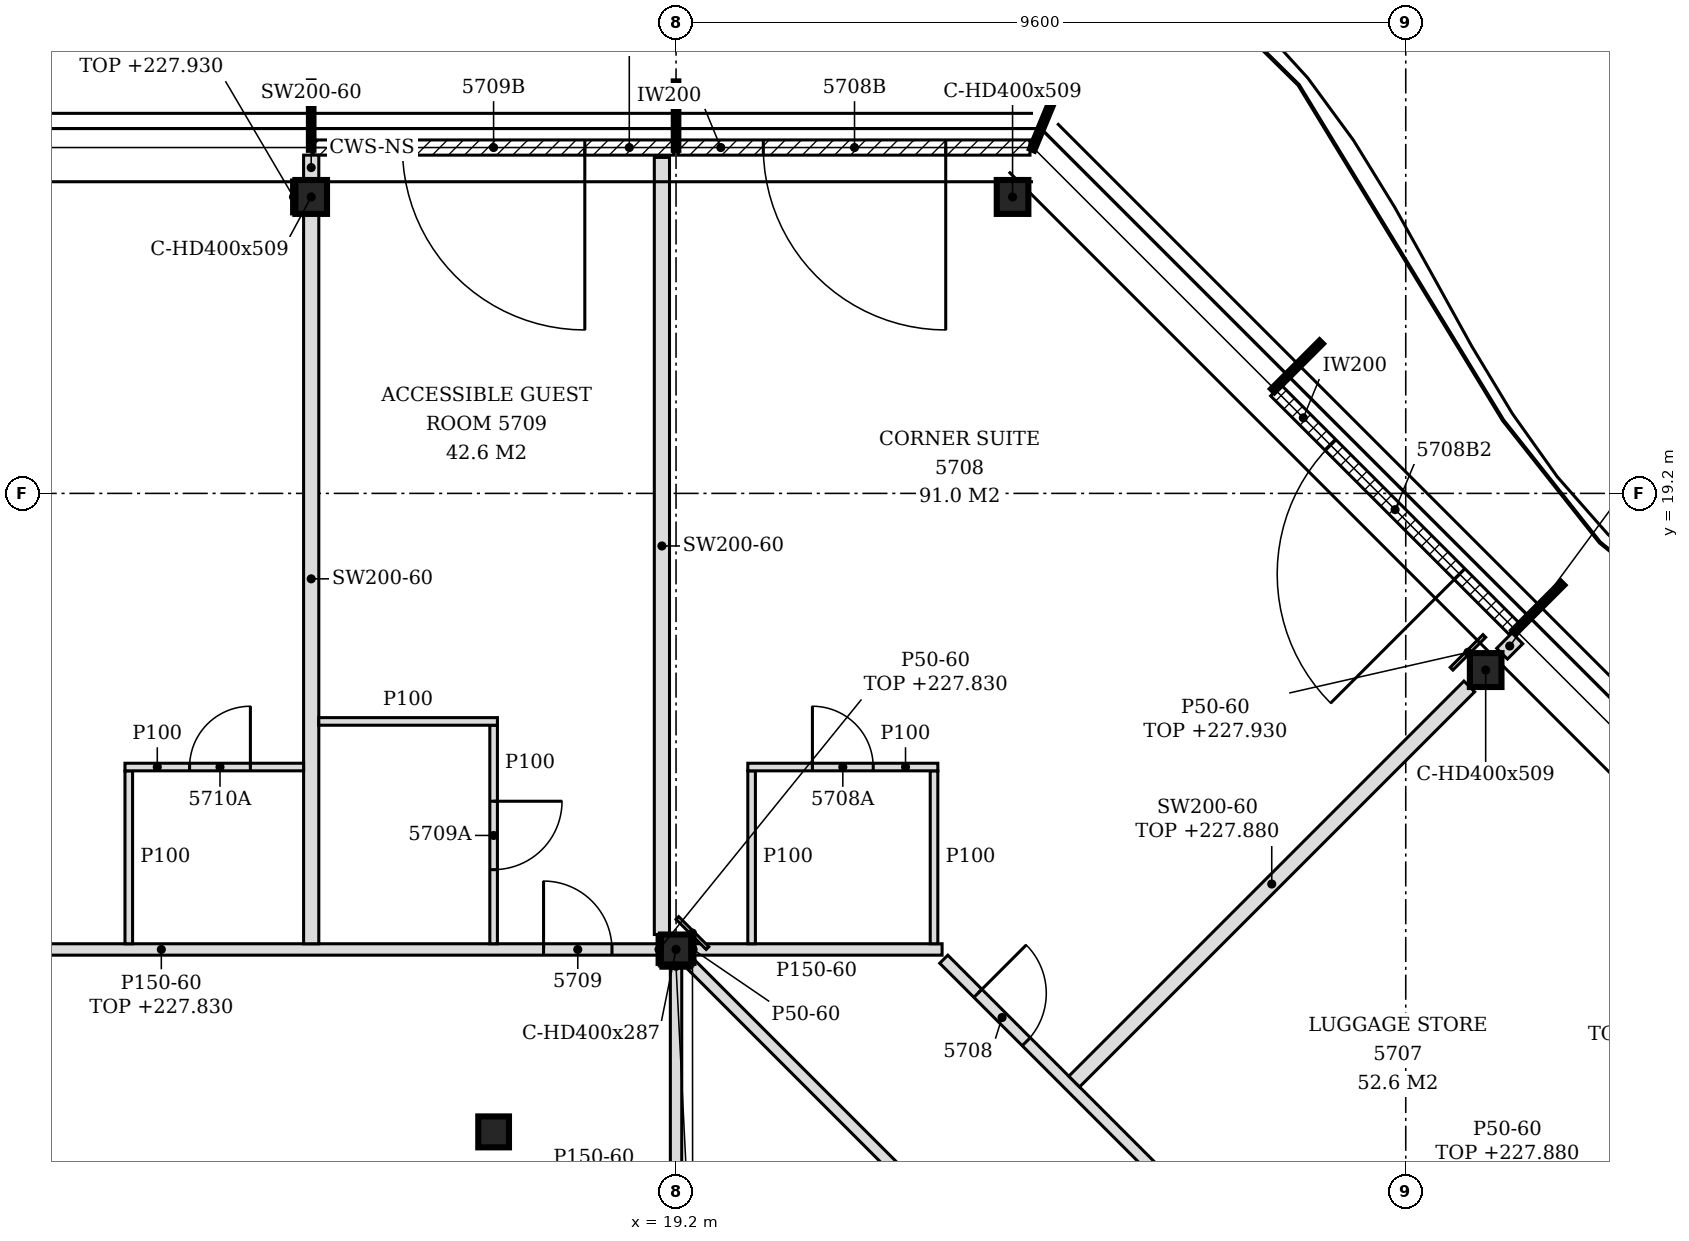
"""IFC4 building model, lengths in metres.
Left out: names, types, materials, properties, quantities, classifications, styles, units other than length and angle.
Written with IfcOpenShell. Run it as: python <this file> out.ifc"""

import sys

from ifc_helpers import new_model, si_unit, direction, frame, frame_2d, origin, origin_2d, place, context, subcontext, project, spatial, polyline, rectangle, i_section, outline, extrude, element, fill, save


model = new_model("IFC4")
c1 = context("Model", 3, precision=1e-05, world=origin(), true_north=direction((0.0, 1.0)))
c2 = subcontext(c1, "Body", "Model", "MODEL_VIEW")
j1 = project(units=[si_unit("LENGTHUNIT", "METRE"), si_unit("PLANEANGLEUNIT", "RADIAN")], contexts=[c1])
p1 = place(None, origin())
s1 = spatial("IfcSite", under=j1, at=p1, CompositionType="ELEMENT")
p2 = place(p1, origin())
s2 = spatial("IfcBuilding", under=s1, at=p2, CompositionType="ELEMENT")
p3 = place(p2, frame((0.0, 0.0, 225.0)))
s3 = spatial("IfcBuildingStorey", under=s2, at=p3, CompositionType="ELEMENT", Elevation=225.0)
for number, where, z_axis, x_axis in (
    (1, (29.852, 16.876, -0.15), (0.0, 0.0, 1.0), (1.0, 0.0, 0.0)),
    (2, (23.627, 23.1, -0.15), (0.0, 0.0, 1.0), (1.0, 0.0, 0.0)),
    (3, (14.4, 23.1, -0.15), (0.0, 0.0, 1.0), (1.0, 0.0, 0.0)),
):
    element("IfcColumn", number, at=place(p3, frame(where, z_axis=z_axis, x_axis=x_axis)), inside=s3, PredefinedType="COLUMN", context=c2, shape_type="SweptSolid", body=[
        extrude(i_section(OverallWidth=0.416, OverallDepth=0.446, WebThickness=0.039, FlangeThickness=0.063, FilletRadius=0.015, at=origin_2d()), origin(), (0.0, 0.0, 1.0), 3.6),
    ])
p4 = place(p3, frame((19.2, 13.2, -0.15), z_axis=(0.0, 0.0, 1.0), x_axis=(1.0, 0.0, 0.0)))
e4 = element("IfcColumn", 4, at=p4, inside=s3, PredefinedType="COLUMN", context=c2, shape_type="SweptSolid", body=[
    extrude(i_section(OverallWidth=0.399, OverallDepth=0.393, WebThickness=0.023, FlangeThickness=0.037, FilletRadius=0.015, at=origin_2d()), origin(), (0.0, 0.0, 1.0), 3.6),
])
p5 = place(p3, frame((16.8, 10.8, -0.15), z_axis=(0.0, 0.0, 1.0), x_axis=(1.0, 0.0, 0.0)))
e5 = element("IfcColumn", 5, at=p5, inside=s3, PredefinedType="COLUMN", context=c2, shape_type="SweptSolid", body=[
    extrude(i_section(OverallWidth=0.404, OverallDepth=0.407, WebThickness=0.027, FlangeThickness=0.044, FilletRadius=0.015, at=origin_2d()), origin(), (0.0, 0.0, 1.0), 3.6),
])
p6 = place(p3, frame((30.226, 17.42, 0.0), z_axis=(0.0, 0.0, 1.0), x_axis=(-0.707079231393, 0.707134329907, 0.0)))
e6 = element("IfcWall", 6, at=p6, inside=s3, PredefinedType="NOTDEFINED", context=c2, shape_type="SweptSolid", body=[
    extrude(rectangle(XDim=4.431, YDim=0.2, at=frame_2d((2.215, 0.0))), origin(), (0.0, 0.0, 1.0), 3.45),
])
p7 = place(p6, frame((1.015, 0.0, 0.0)))
e7 = element("IfcOpeningElement", 7, at=p7, cuts=e6, PredefinedType="OPENING", context=c2, shape_type="SweptSolid", body=[
    extrude(rectangle(XDim=2.4, YDim=2.4, at=frame_2d((1.2, 1.2))), frame((0.0, 0.11, 0.0), z_axis=(0.0, -1.0, 0.0), x_axis=(1.0, 0.0, 0.0)), (0.0, 0.0, 1.0), 0.22),
])
p8 = place(p3, frame((23.856, 23.75, 0.0), z_axis=(0.0, 0.0, 1.0), x_axis=(-1.0, 0.0, 0.0)))
e8 = element("IfcWall", 8, at=p8, inside=s3, PredefinedType="NOTDEFINED", context=c2, shape_type="SweptSolid", body=[
    extrude(rectangle(XDim=4.626, YDim=0.2, at=frame_2d((2.313, 0.0))), origin(), (0.0, 0.0, 1.0), 3.45),
])
p9 = place(p8, frame((1.108, 0.0, 0.0)))
e9 = element("IfcOpeningElement", 9, at=p9, cuts=e8, PredefinedType="OPENING", context=c2, shape_type="SweptSolid", body=[
    extrude(rectangle(XDim=2.4, YDim=2.4, at=frame_2d((1.2, 1.2))), frame((0.0, 0.11, 0.0), z_axis=(0.0, -1.0, 0.0), x_axis=(1.0, 0.0, 0.0)), (0.0, 0.0, 1.0), 0.22),
])
p10 = place(p3, frame((19.17, 23.75, 0.0), z_axis=(0.0, 0.0, 1.0), x_axis=(-1.0, 0.0, 0.0)))
e10 = element("IfcWall", 10, at=p10, inside=s3, PredefinedType="NOTDEFINED", context=c2, shape_type="SweptSolid", body=[
    extrude(rectangle(XDim=4.74, YDim=0.2, at=frame_2d((2.37, 0.0))), origin(), (0.0, 0.0, 1.0), 3.45),
])
p11 = place(p10, frame((1.17, 0.0, 0.0)))
e11 = element("IfcOpeningElement", 11, at=p11, cuts=e10, PredefinedType="OPENING", context=c2, shape_type="SweptSolid", body=[
    extrude(rectangle(XDim=2.4, YDim=2.4, at=frame_2d((1.2, 1.2))), frame((0.0, 0.11, 0.0), z_axis=(0.0, -1.0, 0.0), x_axis=(1.0, 0.0, 0.0)), (0.0, 0.0, 1.0), 0.22),
])
p12 = place(p3, frame((33.341, 2.453, 0.0), z_axis=(0.0, 0.0, 1.0), x_axis=(-0.707098652635, 0.707114909645, 0.0)))
e12 = element("IfcWall", 12, at=p12, inside=s3, PredefinedType="PARTITIONING", context=c2, shape_type="SweptSolid", body=[
    extrude(rectangle(XDim=15.018, YDim=0.15, at=frame_2d((7.509, 0.0))), origin(), (0.0, 0.0, 1.0), 2.88),
])
p13 = place(p12, frame((4.766, 0.0, 0.0)))
e13 = element("IfcOpeningElement", 13, at=p13, cuts=e12, PredefinedType="OPENING", context=c2, shape_type="SweptSolid", body=[
    extrude(rectangle(XDim=0.9, YDim=2.1, at=frame_2d((0.45, 1.05))), frame((0.0, 0.085, 0.0), z_axis=(0.0, -1.0, 0.0), x_axis=(1.0, 0.0, 0.0)), (0.0, 0.0, 1.0), 0.17),
])
p14 = place(p12, frame((9.167, 0.0, 0.0)))
e14 = element("IfcOpeningElement", 14, at=p14, cuts=e12, PredefinedType="OPENING", context=c2, shape_type="SweptSolid", body=[
    extrude(rectangle(XDim=0.9, YDim=2.1, at=frame_2d((0.45, 1.05))), frame((0.0, 0.085, 0.0), z_axis=(0.0, -1.0, 0.0), x_axis=(1.0, 0.0, 0.0)), (0.0, 0.0, 1.0), 0.17),
])
p15 = place(p12, frame((13.482, 0.0, 0.0)))
e15 = element("IfcOpeningElement", 15, at=p15, cuts=e12, PredefinedType="OPENING", context=c2, shape_type="SweptSolid", body=[
    extrude(rectangle(XDim=0.9, YDim=2.1, at=frame_2d((0.45, 1.05))), frame((0.0, 0.085, 0.0), z_axis=(0.0, -1.0, 0.0), x_axis=(1.0, 0.0, 0.0)), (0.0, 0.0, 1.0), 0.17),
])
p16 = place(p3, frame((19.2, 3.675, 0.0), z_axis=(0.0, 0.0, 1.0), x_axis=(0.0, 1.0, 0.0)))
e16 = element("IfcWall", 16, at=p16, inside=s3, PredefinedType="PARTITIONING", context=c2, shape_type="SweptSolid", body=[
    extrude(rectangle(XDim=9.328, YDim=0.15, at=frame_2d((4.664, 0.0))), origin(), (0.0, 0.0, 1.0), 2.83),
])
p17 = place(p16, frame((3.125, 0.0, 0.0)))
e17 = element("IfcOpeningElement", 17, at=p17, cuts=e16, PredefinedType="OPENING", context=c2, shape_type="SweptSolid", body=[
    extrude(rectangle(XDim=0.8, YDim=2.1, at=frame_2d((0.4, 1.05))), frame((0.0, 0.085, 0.0), z_axis=(0.0, -1.0, 0.0), x_axis=(1.0, 0.0, 0.0)), (0.0, 0.0, 1.0), 0.17),
])
p18 = place(p3, frame((28.672, 3.728, 0.0), z_axis=(0.0, 0.0, 1.0), x_axis=(-0.707116088468, 0.707097473782, 0.0)))
e18 = element("IfcWall", 18, at=p18, inside=s3, PredefinedType="PARTITIONING", context=c2, shape_type="SweptSolid", body=[
    extrude(rectangle(XDim=13.115, YDim=0.15, at=frame_2d((6.558, 0.0))), origin(), (0.0, 0.0, 1.0), 2.88),
])
p19 = place(p18, frame((6.157, 0.0, 0.0)))
e19 = element("IfcOpeningElement", 19, at=p19, cuts=e18, PredefinedType="OPENING", context=c2, shape_type="SweptSolid", body=[
    extrude(rectangle(XDim=0.9, YDim=2.1, at=frame_2d((0.45, 1.05))), frame((0.0, 0.085, 0.0), z_axis=(0.0, -1.0, 0.0), x_axis=(1.0, 0.0, 0.0)), (0.0, 0.0, 1.0), 0.17),
])
p20 = place(p3, frame((30.662, 5.238, 0.0), z_axis=(0.0, 0.0, 1.0), x_axis=(0.707106781187, 0.707106781187, 0.0)))
e20 = element("IfcWall", 20, at=p20, inside=s3, PredefinedType="PARTITIONING", context=c2, shape_type="SweptSolid", body=[
    extrude(rectangle(XDim=7.351, YDim=0.2, at=frame_2d((3.676, 0.0))), origin(), (0.0, 0.0, 1.0), 2.93),
])
p21 = place(p3, frame((31.398, 9.798, 0.0), z_axis=(0.0, 0.0, 1.0), x_axis=(0.707133900936, 0.707079660397, 0.0)))
e21 = element("IfcWall", 21, at=p21, inside=s3, PredefinedType="PARTITIONING", context=c2, shape_type="SweptSolid", body=[
    extrude(rectangle(XDim=4.501, YDim=0.2, at=frame_2d((2.25, 0.0))), origin(), (0.0, 0.0, 1.0), 2.63),
])
p22 = place(p3, frame((24.438, 11.462, 0.0), z_axis=(0.0, 0.0, 1.0), x_axis=(0.707090175614, 0.707123386369, 0.0)))
e22 = element("IfcWall", 22, at=p22, inside=s3, PredefinedType="PARTITIONING", context=c2, shape_type="SweptSolid", body=[
    extrude(rectangle(XDim=7.351, YDim=0.2, at=frame_2d((3.676, 0.0))), origin(), (0.0, 0.0, 1.0), 2.88),
])
p23 = place(p3, frame((7.399, 13.2, 0.0), z_axis=(0.0, 0.0, 1.0), x_axis=(1.0, 0.0, 0.0)))
e23 = element("IfcWall", 23, at=p23, inside=s3, PredefinedType="PARTITIONING", context=c2, shape_type="SweptSolid", body=[
    extrude(rectangle(XDim=11.601, YDim=0.15, at=frame_2d((5.801, 0.0))), origin(), (0.0, 0.0, 1.0), 2.83),
])
p24 = place(p23, frame((10.058, 0.0, 0.0)))
e24 = element("IfcOpeningElement", 24, at=p24, cuts=e23, PredefinedType="OPENING", context=c2, shape_type="SweptSolid", body=[
    extrude(rectangle(XDim=0.9, YDim=2.1, at=frame_2d((0.45, 1.05))), frame((0.0, 0.085, 0.0), z_axis=(0.0, -1.0, 0.0), x_axis=(1.0, 0.0, 0.0)), (0.0, 0.0, 1.0), 0.17),
])
p25 = place(p3, frame((19.399, 13.2, 0.0), z_axis=(0.0, 0.0, 1.0), x_axis=(1.0, 0.0, 0.0)))
e25 = element("IfcWall", 25, at=p25, inside=s3, PredefinedType="PARTITIONING", context=c2, shape_type="SweptSolid", body=[
    extrude(rectangle(XDim=3.301, YDim=0.15, at=frame_2d((1.65, 0.0))), origin(), (0.0, 0.0, 1.0), 3.45),
])
p26 = place(p3, frame((12.0, 13.275, 0.0), z_axis=(0.0, 0.0, 1.0), x_axis=(0.0, 1.0, 0.0)))
e26 = element("IfcWall", 26, at=p26, inside=s3, PredefinedType="PARTITIONING", context=c2, shape_type="SweptSolid", body=[
    extrude(outline(polyline([(0.0, 0.0), (2.275, 0.0), (2.275, 3.45), (0.075, 3.45), (0.073, 2.83), (0.0, 2.83), (0.0, 0.0)])), frame((0.0, 0.05, 0.0), z_axis=(0.0, -1.0, 0.0), x_axis=(1.0, 0.0, 0.0)), (0.0, 0.0, 1.0), 0.1),
])
p27 = place(p3, frame((14.4, 13.275, 0.0), z_axis=(0.0, 0.0, 1.0), x_axis=(0.0, 1.0, 0.0)))
e27 = element("IfcWall", 27, at=p27, inside=s3, PredefinedType="PARTITIONING", context=c2, shape_type="SweptSolid", body=[
    extrude(outline(polyline([(0.0, 0.0), (9.602, 0.0), (9.602, 3.45), (6.03, 3.45), (6.028, 2.88), (5.82, 2.88), (5.818, 3.45), (0.075, 3.45), (0.073, 2.83), (0.0, 2.83), (0.0, 0.0)])), frame((0.0, 0.1, 0.0), z_axis=(0.0, -1.0, 0.0), x_axis=(1.0, 0.0, 0.0)), (0.0, 0.0, 1.0), 0.2),
])
p28 = place(p3, frame((16.8, 13.275, 0.0), z_axis=(0.0, 0.0, 1.0), x_axis=(0.0, 1.0, 0.0)))
e28 = element("IfcWall", 28, at=p28, inside=s3, PredefinedType="PARTITIONING", context=c2, shape_type="SweptSolid", body=[
    extrude(outline(polyline([(0.0, 0.0), (2.875, 0.0), (2.875, 3.45), (0.075, 3.45), (0.073, 2.83), (0.0, 2.83), (0.0, 0.0)])), frame((0.0, 0.05, 0.0), z_axis=(0.0, -1.0, 0.0), x_axis=(1.0, 0.0, 0.0)), (0.0, 0.0, 1.0), 0.1),
])
p29 = place(p28, frame((0.975, 0.0, 0.0)))
e29 = element("IfcOpeningElement", 29, at=p29, cuts=e28, PredefinedType="OPENING", context=c2, shape_type="SweptSolid", body=[
    extrude(rectangle(XDim=0.9, YDim=2.1, at=frame_2d((0.45, 1.05))), frame((0.0, 0.06, 0.0), z_axis=(0.0, -1.0, 0.0), x_axis=(1.0, 0.0, 0.0)), (0.0, 0.0, 1.0), 0.12),
])
for number, where, z_axis, x_axis in (
    (30, (20.194, 13.275, 0.0), (0.0, 0.0, 1.0), (0.0, 1.0, 0.0)),
    (31, (22.594, 13.275, 0.0), (0.0, 0.0, 1.0), (0.0, 1.0, 0.0)),
):
    element("IfcWall", number, at=place(p3, frame(where, z_axis=z_axis, x_axis=x_axis)), inside=s3, PredefinedType="PARTITIONING", context=c2, shape_type="SweptSolid", body=[
        extrude(outline(polyline([(0.0, 0.0), (2.275, 0.0), (2.275, 3.45), (1.23, 3.45), (1.228, 2.88), (1.02, 2.88), (1.018, 3.45), (0.0, 3.45), (0.0, 0.0)])), frame((0.0, 0.05, 0.0), z_axis=(0.0, -1.0, 0.0), x_axis=(1.0, 0.0, 0.0)), (0.0, 0.0, 1.0), 0.1),
    ])
p30 = place(p3, frame((19.014, 13.396, 0.0), z_axis=(0.0, 0.0, 1.0), x_axis=(0.0, 1.0, 0.0)))
e32 = element("IfcWall", 32, at=p30, inside=s3, PredefinedType="PARTITIONING", context=c2, shape_type="SweptSolid", body=[
    extrude(outline(polyline([(0.0, 0.0), (10.224, 0.0), (10.223, 3.45), (9.854, 3.45), (9.852, 2.93), (5.908, 2.93), (5.906, 2.88), (5.698, 2.88), (5.697, 2.93), (0.003, 2.93), (0.001, 3.45), (0.0, 3.45), (0.0, 0.0)])), frame((0.0, 0.1, 0.0), z_axis=(0.0, -1.0, 0.0), x_axis=(1.0, 0.0, 0.0)), (0.0, 0.0, 1.0), 0.2),
])
p31 = place(p3, frame((11.95, 15.6, 0.0), z_axis=(0.0, 0.0, 1.0), x_axis=(1.0, 0.0, 0.0)))
e33 = element("IfcWall", 33, at=p31, inside=s3, PredefinedType="PARTITIONING", context=c2, shape_type="SweptSolid", body=[
    extrude(rectangle(XDim=2.35, YDim=0.1, at=frame_2d((1.175, 0.0))), origin(), (0.0, 0.0, 1.0), 3.45),
])
p32 = place(p31, frame((0.85, 0.0, 0.0)))
e34 = element("IfcOpeningElement", 34, at=p32, cuts=e33, PredefinedType="OPENING", context=c2, shape_type="SweptSolid", body=[
    extrude(rectangle(XDim=0.8, YDim=2.1, at=frame_2d((0.4, 1.05))), frame((0.0, 0.06, 0.0), z_axis=(0.0, -1.0, 0.0), x_axis=(1.0, 0.0, 0.0)), (0.0, 0.0, 1.0), 0.12),
])
p33 = place(p3, frame((20.144, 15.6, 0.0), z_axis=(0.0, 0.0, 1.0), x_axis=(1.0, 0.0, 0.0)))
e35 = element("IfcWall", 35, at=p33, inside=s3, PredefinedType="PARTITIONING", context=c2, shape_type="SweptSolid", body=[
    extrude(rectangle(XDim=2.5, YDim=0.1, at=frame_2d((1.25, 0.0))), origin(), (0.0, 0.0, 1.0), 3.45),
])
p34 = place(p33, frame((0.85, 0.0, 0.0)))
e36 = element("IfcOpeningElement", 36, at=p34, cuts=e35, PredefinedType="OPENING", context=c2, shape_type="SweptSolid", body=[
    extrude(rectangle(XDim=0.8, YDim=2.1, at=frame_2d((0.4, 1.05))), frame((0.0, 0.06, 0.0), z_axis=(0.0, -1.0, 0.0), x_axis=(1.0, 0.0, 0.0)), (0.0, 0.0, 1.0), 0.12),
])
p35 = place(p3, frame((14.5, 16.2, 0.0), z_axis=(0.0, 0.0, 1.0), x_axis=(1.0, 0.0, 0.0)))
e37 = element("IfcWall", 37, at=p35, inside=s3, PredefinedType="PARTITIONING", context=c2, shape_type="SweptSolid", body=[
    extrude(rectangle(XDim=2.35, YDim=0.1, at=frame_2d((1.175, 0.0))), origin(), (0.0, 0.0, 1.0), 3.45),
])
p36 = place(p3, frame((30.067, 17.091, 0.0), z_axis=(0.0, 0.0, 1.0), x_axis=(0.707106781187, 0.707106781187, 0.0)))
e38 = element("IfcWall", 38, at=p36, inside=s3, PredefinedType="PARTITIONING", context=c2, shape_type="SweptSolid", body=[
    extrude(rectangle(XDim=0.285, YDim=0.2, at=frame_2d((0.143, 0.0))), origin(), (0.0, 0.0, 1.0), 3.45),
])
p37 = place(p3, frame((14.4, 23.323, 0.0), z_axis=(0.0, 0.0, 1.0), x_axis=(0.0, 1.0, 0.0)))
e39 = element("IfcWall", 39, at=p37, inside=s3, PredefinedType="PARTITIONING", context=c2, shape_type="SweptSolid", body=[
    extrude(rectangle(XDim=0.327, YDim=0.2, at=frame_2d((0.164, 0.0))), origin(), (0.0, 0.0, 1.0), 3.45),
])
p38 = place(p3, frame((18.976, 13.003, 0.0), z_axis=(0.0, 0.0, 1.0), x_axis=(0.0, 1.0, 0.0)))
e40 = element("IfcWall", 40, at=p38, inside=s3, PredefinedType="PARTITIONING", context=c2, shape_type="SweptSolid", body=[
    extrude(rectangle(XDim=0.393, YDim=0.05, at=frame_2d((0.197, 0.0))), origin(), (0.0, 0.0, 1.0), 2.83),
])
p39 = place(p3, frame((19.614, 13.218, 0.0), z_axis=(0.0, 0.0, 1.0), x_axis=(-0.707106781187, 0.707106781187, 0.0)))
e41 = element("IfcWall", 41, at=p39, inside=s3, PredefinedType="PARTITIONING", context=c2, shape_type="SweptSolid", body=[
    extrude(rectangle(XDim=0.56, YDim=0.05, at=frame_2d((0.28, 0.0))), origin(), (0.0, 0.0, 1.0), 2.93),
])
p40 = place(p3, frame((29.403, 16.893, 0.0), z_axis=(0.0, 0.0, 1.0), x_axis=(0.706906496032, 0.707307009627, 0.0)))
e42 = element("IfcWall", 42, at=p40, inside=s3, PredefinedType="PARTITIONING", context=c2, shape_type="SweptSolid", body=[
    extrude(rectangle(XDim=0.61, YDim=0.05, at=frame_2d((0.305, 0.0))), origin(), (0.0, 0.0, 1.0), 2.93),
])
p41 = place(p3, frame((19.0, 12.979, 0.0), z_axis=(0.0, 0.0, 1.0), x_axis=(1.0, 0.0, 0.0)))
e43 = element("IfcWall", 43, at=p41, inside=s3, PredefinedType="PARTITIONING", context=c2, shape_type="SweptSolid", body=[
    extrude(rectangle(XDim=0.399, YDim=0.05, at=frame_2d((0.199, 0.0))), origin(), (0.0, 0.0, 1.0), 2.83),
])
p42 = place(p3, frame((14.167, 22.877, 0.0), z_axis=(0.0, 0.0, 1.0), x_axis=(0.0, 1.0, 0.0)))
e44 = element("IfcWall", 44, at=p42, inside=s3, PredefinedType="PARTITIONING", context=c2, shape_type="SweptSolid", body=[
    extrude(rectangle(XDim=0.446, YDim=0.05, at=frame_2d((0.223, 0.0))), origin(), (0.0, 0.0, 1.0), 2.93),
])
p43 = place(p3, frame((19.425, 13.003, 0.0), z_axis=(0.0, 0.0, 1.0), x_axis=(0.0, 1.0, 0.0)))
e45 = element("IfcWall", 45, at=p43, inside=s3, PredefinedType="PARTITIONING", context=c2, shape_type="SweptSolid", body=[
    extrude(rectangle(XDim=0.393, YDim=0.05, at=frame_2d((0.197, 0.0))), origin(), (0.0, 0.0, 1.0), 3.45),
])
p44 = place(p7, origin())
e46 = element("IfcDoor", 46, at=p44, inside=s3, OperationType="SINGLE_SWING_LEFT", PredefinedType="DOOR", context=c2, shape_type="SweptSolid", body=[
    extrude(rectangle(XDim=2.4, YDim=2.4, at=frame_2d((1.2, 1.2))), frame((0.0, 0.025, 0.0), z_axis=(0.0, -1.0, 0.0), x_axis=(1.0, 0.0, 0.0)), (0.0, 0.0, 1.0), 0.05),
])
fill(e7, e46)
p45 = place(p9, origin())
e47 = element("IfcDoor", 47, at=p45, inside=s3, OperationType="SINGLE_SWING_LEFT", PredefinedType="DOOR", context=c2, shape_type="SweptSolid", body=[
    extrude(rectangle(XDim=2.4, YDim=2.4, at=frame_2d((1.2, 1.2))), frame((0.0, 0.025, 0.0), z_axis=(0.0, -1.0, 0.0), x_axis=(1.0, 0.0, 0.0)), (0.0, 0.0, 1.0), 0.05),
])
fill(e9, e47)
p46 = place(p11, origin())
e48 = element("IfcDoor", 48, at=p46, inside=s3, OperationType="SINGLE_SWING_LEFT", PredefinedType="DOOR", context=c2, shape_type="SweptSolid", body=[
    extrude(rectangle(XDim=2.4, YDim=2.4, at=frame_2d((1.2, 1.2))), frame((0.0, 0.025, 0.0), z_axis=(0.0, -1.0, 0.0), x_axis=(1.0, 0.0, 0.0)), (0.0, 0.0, 1.0), 0.05),
])
fill(e11, e48)
p47 = place(p15, frame((0.9, 0.0, 0.0), z_axis=(0.0, 0.0, 1.0), x_axis=(-1.0, 0.0, 0.0)))
e49 = element("IfcDoor", 49, at=p47, inside=s3, OperationType="SINGLE_SWING_LEFT", PredefinedType="DOOR", context=c2, shape_type="SweptSolid", body=[
    extrude(rectangle(XDim=0.9, YDim=2.1, at=frame_2d((0.45, 1.05))), frame((0.0, 0.025, 0.0), z_axis=(0.0, -1.0, 0.0), x_axis=(1.0, 0.0, 0.0)), (0.0, 0.0, 1.0), 0.05),
])
fill(e15, e49)
p48 = place(p34, origin())
e50 = element("IfcDoor", 50, at=p48, inside=s3, OperationType="SINGLE_SWING_LEFT", PredefinedType="DOOR", context=c2, shape_type="SweptSolid", body=[
    extrude(rectangle(XDim=0.8, YDim=2.1, at=frame_2d((0.4, 1.05))), frame((0.0, 0.025, 0.0), z_axis=(0.0, -1.0, 0.0), x_axis=(1.0, 0.0, 0.0)), (0.0, 0.0, 1.0), 0.05),
])
fill(e36, e50)
p49 = place(p24, origin())
e51 = element("IfcDoor", 51, at=p49, inside=s3, OperationType="SINGLE_SWING_LEFT", PredefinedType="DOOR", context=c2, shape_type="SweptSolid", body=[
    extrude(rectangle(XDim=0.9, YDim=2.1, at=frame_2d((0.45, 1.05))), frame((0.0, 0.025, 0.0), z_axis=(0.0, -1.0, 0.0), x_axis=(1.0, 0.0, 0.0)), (0.0, 0.0, 1.0), 0.05),
])
fill(e24, e51)
p50 = place(p29, frame((0.9, 0.0, 0.0), z_axis=(0.0, 0.0, 1.0), x_axis=(-1.0, 0.0, 0.0)))
e52 = element("IfcDoor", 52, at=p50, inside=s3, OperationType="SINGLE_SWING_LEFT", PredefinedType="DOOR", context=c2, shape_type="SweptSolid", body=[
    extrude(rectangle(XDim=0.9, YDim=2.1, at=frame_2d((0.45, 1.05))), frame((0.0, 0.025, 0.0), z_axis=(0.0, -1.0, 0.0), x_axis=(1.0, 0.0, 0.0)), (0.0, 0.0, 1.0), 0.05),
])
fill(e29, e52)
p51 = place(p32, origin())
e53 = element("IfcDoor", 53, at=p51, inside=s3, OperationType="SINGLE_SWING_RIGHT", PredefinedType="DOOR", context=c2, shape_type="SweptSolid", body=[
    extrude(rectangle(XDim=0.8, YDim=2.1, at=frame_2d((0.4, 1.05))), frame((0.0, 0.025, 0.0), z_axis=(0.0, -1.0, 0.0), x_axis=(1.0, 0.0, 0.0)), (0.0, 0.0, 1.0), 0.05),
])
fill(e34, e53)
save(model, sys.argv[1])
